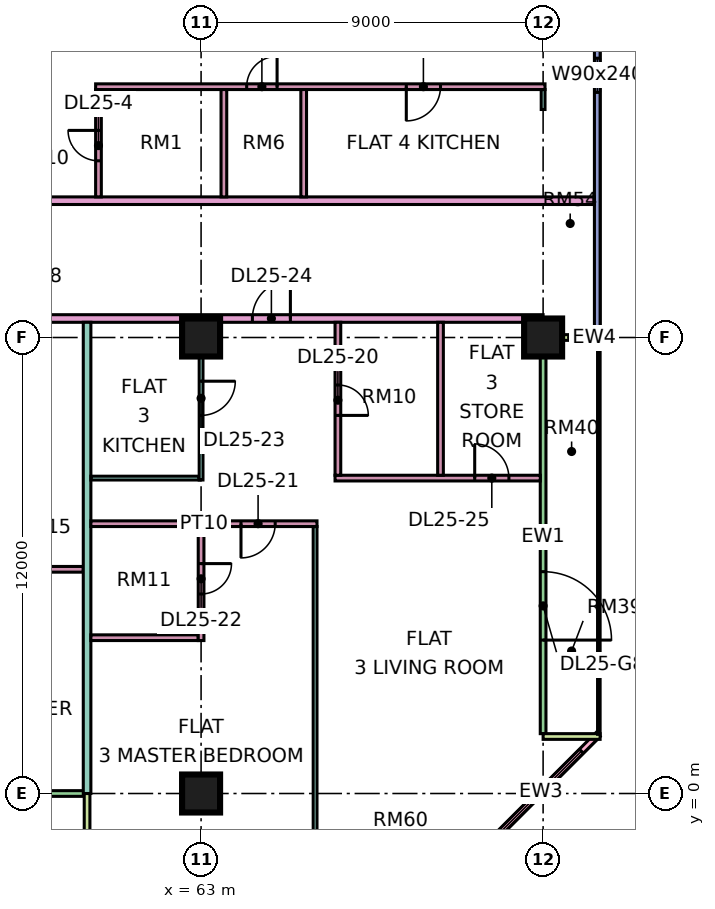
"""IFC4 building model, lengths in metres.
Left out: names, types, materials, properties, quantities, classifications, styles, units other than length and angle.
Written with IfcOpenShell. Run it as: python <this file> out.ifc"""

import sys

from ifc_helpers import new_model, si_unit, direction, frame, frame_2d, origin, origin_2d, place, context, subcontext, project, spatial, rectangle, extrude, element, fill, save


model = new_model("IFC4")
c1 = context("Model", 3, precision=1e-05, world=origin(), true_north=direction((0.0, 1.0)))
c2 = subcontext(c1, "Body", "Model", "MODEL_VIEW")
j1 = project(units=[si_unit("LENGTHUNIT", "METRE"), si_unit("PLANEANGLEUNIT", "RADIAN")], contexts=[c1])
p1 = place(None, origin())
s1 = spatial("IfcSite", under=j1, at=p1, CompositionType="ELEMENT")
p2 = place(p1, origin())
s2 = spatial("IfcBuilding", under=s1, at=p2, CompositionType="ELEMENT")
p3 = place(p2, frame((0.0, 0.0, 110.65)))
s3 = spatial("IfcBuildingStorey", under=s2, at=p3, CompositionType="ELEMENT", Elevation=110.65)
for number, where, z_axis, x_axis in (
    (1, (63.0, 0.0, 0.0), (0.0, 0.0, 1.0), (1.0, 0.0, 0.0)),
    (2, (63.0, 12.0, 0.0), (0.0, 0.0, 1.0), (1.0, 0.0, 0.0)),
    (3, (72.0, 12.0, 0.0), (0.0, 0.0, 1.0), (1.0, 0.0, 0.0)),
):
    element("IfcColumn", number, at=place(p3, frame(where, z_axis=z_axis, x_axis=x_axis)), inside=s3, PredefinedType="COLUMN", context=c2, shape_type="SweptSolid", body=[
        extrude(rectangle(XDim=1.0, YDim=1.0, at=origin_2d()), origin(), (0.0, 0.0, 1.0), 3.75),
    ])
p4 = place(p3, frame((48.075, 0.0, 0.0), z_axis=(0.0, 0.0, 1.0), x_axis=(1.0, 0.0, 0.0)))
e4 = element("IfcWall", 4, at=p4, inside=s3, PredefinedType="SOLIDWALL", context=c2, shape_type="SweptSolid", body=[
    extrude(rectangle(XDim=11.85, YDim=0.15, at=frame_2d((5.925, 0.0))), origin(), (0.0, 0.0, 1.0), 3.35),
])
p5 = place(p4, frame((0.562, 0.0, 0.45)))
e5 = element("IfcOpeningElement", 5, at=p5, cuts=e4, PredefinedType="OPENING", context=c2, shape_type="SweptSolid", body=[
    extrude(rectangle(XDim=1.8, YDim=2.4, at=frame_2d((0.9, 1.2))), frame((0.0, 0.085, 0.0), z_axis=(0.0, -1.0, 0.0), x_axis=(1.0, 0.0, 0.0)), (0.0, 0.0, 1.0), 0.17),
])
p6 = place(p4, frame((3.525, 0.0, 0.0)))
e6 = element("IfcOpeningElement", 6, at=p6, cuts=e4, PredefinedType="OPENING", context=c2, shape_type="SweptSolid", body=[
    extrude(rectangle(XDim=1.2, YDim=2.4, at=frame_2d((0.6, 1.2))), frame((0.0, 0.085, 0.0), z_axis=(0.0, -1.0, 0.0), x_axis=(1.0, 0.0, 0.0)), (0.0, 0.0, 1.0), 0.17),
])
p7 = place(p4, frame((7.688, 0.0, 0.45)))
e7 = element("IfcOpeningElement", 7, at=p7, cuts=e4, PredefinedType="OPENING", context=c2, shape_type="SweptSolid", body=[
    extrude(rectangle(XDim=3.0, YDim=2.4, at=frame_2d((1.5, 1.2))), frame((0.0, 0.085, 0.0), z_axis=(0.0, -1.0, 0.0), x_axis=(1.0, 0.0, 0.0)), (0.0, 0.0, 1.0), 0.17),
])
p8 = place(p3, frame((60.0, -1.5, 0.0), z_axis=(0.0, 0.0, 1.0), x_axis=(0.0, 1.0, 0.0)))
e8 = element("IfcWall", 8, at=p8, inside=s3, PredefinedType="SOLIDWALL", context=c2, shape_type="SweptSolid", body=[
    extrude(rectangle(XDim=1.5, YDim=0.15, at=frame_2d((0.75, 0.0))), origin(), (0.0, 0.0, 1.0), 3.35),
])
p9 = place(p3, frame((70.447, -1.447, 0.0), z_axis=(0.0, 0.0, 1.0), x_axis=(0.707106781187, 0.707106781187, 0.0)))
e9 = element("IfcWall", 9, at=p9, inside=s3, PredefinedType="SOLIDWALL", context=c2, shape_type="SweptSolid", body=[
    extrude(rectangle(XDim=4.243, YDim=0.15, at=frame_2d((2.121, 0.0))), origin(), (0.0, 0.0, 1.0), 3.35),
])
p10 = place(p9, frame((0.621, 0.0, 0.45)))
e10 = element("IfcOpeningElement", 10, at=p10, cuts=e9, PredefinedType="OPENING", context=c2, shape_type="SweptSolid", body=[
    extrude(rectangle(XDim=3.0, YDim=2.4, at=frame_2d((1.5, 1.2))), frame((0.0, 0.085, 0.0), z_axis=(0.0, -1.0, 0.0), x_axis=(1.0, 0.0, 0.0)), (0.0, 0.0, 1.0), 0.17),
])
p11 = place(p3, frame((72.0, 1.575, 0.0), z_axis=(0.0, 0.0, 1.0), x_axis=(0.0, 1.0, 0.0)))
e11 = element("IfcWall", 11, at=p11, inside=s3, PredefinedType="SOLIDWALL", context=c2, shape_type="SweptSolid", body=[
    extrude(rectangle(XDim=10.35, YDim=0.15, at=frame_2d((5.175, 0.0))), origin(), (0.0, 0.0, 1.0), 3.35),
])
p12 = place(p11, frame((2.462, 0.0, 0.0)))
e12 = element("IfcOpeningElement", 12, at=p12, cuts=e11, PredefinedType="OPENING", context=c2, shape_type="SweptSolid", body=[
    extrude(rectangle(XDim=1.8, YDim=2.4, at=frame_2d((0.9, 1.2))), frame((0.0, 0.085, 0.0), z_axis=(0.0, -1.0, 0.0), x_axis=(1.0, 0.0, 0.0)), (0.0, 0.0, 1.0), 0.17),
])
for number, where, z_axis, x_axis in (
    (13, (73.5, 1.5, 0.0), (0.0, 0.0, 1.0), (-1.0, 0.0, 0.0)),
    (14, (73.5, 12.0, 0.0), (0.0, 0.0, 1.0), (-1.0, 0.0, 0.0)),
):
    element("IfcWall", number, at=place(p3, frame(where, z_axis=z_axis, x_axis=x_axis)), inside=s3, PredefinedType="SOLIDWALL", context=c2, shape_type="SweptSolid", body=[
        extrude(rectangle(XDim=1.5, YDim=0.15, at=frame_2d((0.75, 0.0))), origin(), (0.0, 0.0, 1.0), 3.35),
    ])
p13 = place(p3, frame((73.425, 12.075, 0.0), z_axis=(0.0, 0.0, 1.0), x_axis=(0.0, 1.0, 0.0)))
e15 = element("IfcWall", 15, at=p13, inside=s3, PredefinedType="SOLIDWALL", context=c2, shape_type="SweptSolid", body=[
    extrude(rectangle(XDim=10.425, YDim=0.15, at=frame_2d((5.212, 0.0))), origin(), (0.0, 0.0, 1.0), 3.35),
])
p14 = place(p13, frame((6.375, 0.0, 0.45)))
e16 = element("IfcOpeningElement", 16, at=p14, cuts=e15, PredefinedType="OPENING", context=c2, shape_type="SweptSolid", body=[
    extrude(rectangle(XDim=0.9, YDim=2.4, at=frame_2d((0.45, 1.2))), frame((0.0, 0.085, 0.0), z_axis=(0.0, -1.0, 0.0), x_axis=(1.0, 0.0, 0.0)), (0.0, 0.0, 1.0), 0.17),
])
p15 = place(p13, frame((8.175, 0.0, 0.45)))
e17 = element("IfcOpeningElement", 17, at=p15, cuts=e15, PredefinedType="OPENING", context=c2, shape_type="SweptSolid", body=[
    extrude(rectangle(XDim=1.8, YDim=2.4, at=frame_2d((0.9, 1.2))), frame((0.0, 0.085, 0.0), z_axis=(0.0, -1.0, 0.0), x_axis=(1.0, 0.0, 0.0)), (0.0, 0.0, 1.0), 0.17),
])
p16 = place(p3, frame((40.65, 12.5, 0.0), z_axis=(0.0, 0.0, 1.0), x_axis=(1.0, 0.0, 0.0)))
e18 = element("IfcWall", 18, at=p16, inside=s3, PredefinedType="PARTITIONING", context=c2, shape_type="SweptSolid", body=[
    extrude(rectangle(XDim=31.35, YDim=0.2, at=frame_2d((15.675, 0.0))), origin(), (0.0, 0.0, 1.0), 3.35),
])
p17 = place(p16, frame((17.1, 0.0, 0.0)))
e19 = element("IfcOpeningElement", 19, at=p17, cuts=e18, PredefinedType="OPENING", context=c2, shape_type="SweptSolid", body=[
    extrude(rectangle(XDim=1.0, YDim=2.1, at=frame_2d((0.5, 1.05))), frame((0.0, 0.11, 0.0), z_axis=(0.0, -1.0, 0.0), x_axis=(1.0, 0.0, 0.0)), (0.0, 0.0, 1.0), 0.22),
])
p18 = place(p16, frame((23.7, 0.0, 0.0)))
e20 = element("IfcOpeningElement", 20, at=p18, cuts=e18, PredefinedType="OPENING", context=c2, shape_type="SweptSolid", body=[
    extrude(rectangle(XDim=1.0, YDim=2.1, at=frame_2d((0.5, 1.05))), frame((0.0, 0.11, 0.0), z_axis=(0.0, -1.0, 0.0), x_axis=(1.0, 0.0, 0.0)), (0.0, 0.0, 1.0), 0.22),
])
p19 = place(p16, frame((1.05, 0.0, 0.0)))
e21 = element("IfcOpeningElement", 21, at=p19, cuts=e18, PredefinedType="OPENING", context=c2, shape_type="SweptSolid", body=[
    extrude(rectangle(XDim=1.0, YDim=2.1, at=frame_2d((0.5, 1.05))), frame((0.0, 0.11, 0.0), z_axis=(0.0, -1.0, 0.0), x_axis=(1.0, 0.0, 0.0)), (0.0, 0.0, 1.0), 0.22),
])
p20 = place(p3, frame((50.95, 5.9, 0.0), z_axis=(0.0, 0.0, 1.0), x_axis=(1.0, 0.0, 0.0)))
e22 = element("IfcWall", 22, at=p20, inside=s3, PredefinedType="PARTITIONING", context=c2, shape_type="SweptSolid", body=[
    extrude(rectangle(XDim=8.95, YDim=0.15, at=frame_2d((4.475, 0.0))), origin(), (0.0, 0.0, 1.0), 3.35),
])
p21 = place(p20, frame((1.1, 0.0, 0.0)))
e23 = element("IfcOpeningElement", 23, at=p21, cuts=e22, PredefinedType="OPENING", context=c2, shape_type="SweptSolid", body=[
    extrude(rectangle(XDim=0.9, YDim=2.1, at=frame_2d((0.45, 1.05))), frame((0.0, 0.085, 0.0), z_axis=(0.0, -1.0, 0.0), x_axis=(1.0, 0.0, 0.0)), (0.0, 0.0, 1.0), 0.17),
])
p22 = place(p20, frame((7.1, 0.0, 0.0)))
e24 = element("IfcOpeningElement", 24, at=p22, cuts=e22, PredefinedType="OPENING", context=c2, shape_type="SweptSolid", body=[
    extrude(rectangle(XDim=0.9, YDim=2.1, at=frame_2d((0.45, 1.05))), frame((0.0, 0.085, 0.0), z_axis=(0.0, -1.0, 0.0), x_axis=(1.0, 0.0, 0.0)), (0.0, 0.0, 1.0), 0.17),
])
p23 = place(p3, frame((51.225, 15.6, 0.0), z_axis=(0.0, 0.0, 1.0), x_axis=(1.0, 0.0, 0.0)))
e25 = element("IfcWall", 25, at=p23, inside=s3, PredefinedType="PARTITIONING", context=c2, shape_type="SweptSolid", body=[
    extrude(rectangle(XDim=22.125, YDim=0.2, at=frame_2d((11.062, 0.0))), origin(), (0.0, 0.0, 1.0), 3.35),
])
p24 = place(p23, frame((6.725, 0.0, 0.0)))
e26 = element("IfcOpeningElement", 26, at=p24, cuts=e25, PredefinedType="OPENING", context=c2, shape_type="SweptSolid", body=[
    extrude(rectangle(XDim=1.0, YDim=2.1, at=frame_2d((0.5, 1.05))), frame((0.0, 0.11, 0.0), z_axis=(0.0, -1.0, 0.0), x_axis=(1.0, 0.0, 0.0)), (0.0, 0.0, 1.0), 0.22),
])
p25 = place(p23, frame((0.875, 0.0, 0.0)))
e27 = element("IfcOpeningElement", 27, at=p25, cuts=e25, PredefinedType="OPENING", context=c2, shape_type="SweptSolid", body=[
    extrude(rectangle(XDim=1.0, YDim=2.1, at=frame_2d((0.5, 1.05))), frame((0.0, 0.11, 0.0), z_axis=(0.0, -1.0, 0.0), x_axis=(1.0, 0.0, 0.0)), (0.0, 0.0, 1.0), 0.22),
])
p26 = place(p3, frame((60.0, 0.0, 0.0), z_axis=(0.0, 0.0, 1.0), x_axis=(0.0, 1.0, 0.0)))
e28 = element("IfcWall", 28, at=p26, inside=s3, PredefinedType="PARTITIONING", context=c2, shape_type="SweptSolid", body=[
    extrude(rectangle(XDim=12.4, YDim=0.2, at=frame_2d((6.2, 0.0))), origin(), (0.0, 0.0, 1.0), 3.35),
])
p27 = place(p3, frame((60.1, 4.1, 0.0), z_axis=(0.0, 0.0, 1.0), x_axis=(1.0, 0.0, 0.0)))
e29 = element("IfcWall", 29, at=p27, inside=s3, PredefinedType="PARTITIONING", context=c2, shape_type="SweptSolid", body=[
    extrude(rectangle(XDim=2.825, YDim=0.15, at=frame_2d((1.413, 0.0))), origin(), (0.0, 0.0, 1.0), 3.35),
])
p28 = place(p3, frame((60.1, 7.1, 0.0), z_axis=(0.0, 0.0, 1.0), x_axis=(1.0, 0.0, 0.0)))
e30 = element("IfcWall", 30, at=p28, inside=s3, PredefinedType="PARTITIONING", context=c2, shape_type="SweptSolid", body=[
    extrude(rectangle(XDim=5.95, YDim=0.15, at=frame_2d((2.975, 0.0))), origin(), (0.0, 0.0, 1.0), 3.35),
])
p29 = place(p28, frame((3.95, 0.0, 0.0)))
e31 = element("IfcOpeningElement", 31, at=p29, cuts=e30, PredefinedType="OPENING", context=c2, shape_type="SweptSolid", body=[
    extrude(rectangle(XDim=0.9, YDim=2.1, at=frame_2d((0.45, 1.05))), frame((0.0, 0.085, 0.0), z_axis=(0.0, -1.0, 0.0), x_axis=(1.0, 0.0, 0.0)), (0.0, 0.0, 1.0), 0.17),
])
p30 = place(p3, frame((60.1, 8.3, 0.0), z_axis=(0.0, 0.0, 1.0), x_axis=(1.0, 0.0, 0.0)))
e32 = element("IfcWall", 32, at=p30, inside=s3, PredefinedType="PARTITIONING", context=c2, shape_type="SweptSolid", body=[
    extrude(rectangle(XDim=2.85, YDim=0.1, at=frame_2d((1.425, 0.0))), origin(), (0.0, 0.0, 1.0), 3.35),
])
p31 = place(p3, frame((60.225, 18.6, 0.0), z_axis=(0.0, 0.0, 1.0), x_axis=(1.0, 0.0, 0.0)))
e33 = element("IfcWall", 33, at=p31, inside=s3, PredefinedType="PARTITIONING", context=c2, shape_type="SweptSolid", body=[
    extrude(rectangle(XDim=11.825, YDim=0.15, at=frame_2d((5.913, 0.0))), origin(), (0.0, 0.0, 1.0), 3.35),
])
p32 = place(p31, frame((8.175, 0.0, 0.0)))
e34 = element("IfcOpeningElement", 34, at=p32, cuts=e33, PredefinedType="OPENING", context=c2, shape_type="SweptSolid", body=[
    extrude(rectangle(XDim=0.9, YDim=2.1, at=frame_2d((0.45, 1.05))), frame((0.0, 0.085, 0.0), z_axis=(0.0, -1.0, 0.0), x_axis=(1.0, 0.0, 0.0)), (0.0, 0.0, 1.0), 0.17),
])
p33 = place(p31, frame((3.975, 0.0, 0.0)))
e35 = element("IfcOpeningElement", 35, at=p33, cuts=e33, PredefinedType="OPENING", context=c2, shape_type="SweptSolid", body=[
    extrude(rectangle(XDim=0.8, YDim=2.1, at=frame_2d((0.4, 1.05))), frame((0.0, 0.085, 0.0), z_axis=(0.0, -1.0, 0.0), x_axis=(1.0, 0.0, 0.0)), (0.0, 0.0, 1.0), 0.17),
])
p34 = place(p3, frame((60.3, 15.7, 0.0), z_axis=(0.0, 0.0, 1.0), x_axis=(0.0, 1.0, 0.0)))
e36 = element("IfcWall", 36, at=p34, inside=s3, PredefinedType="PARTITIONING", context=c2, shape_type="SweptSolid", body=[
    extrude(rectangle(XDim=2.825, YDim=0.15, at=frame_2d((1.413, 0.0))), origin(), (0.0, 0.0, 1.0), 3.35),
])
p35 = place(p34, frame((0.95, 0.0, 0.0)))
e37 = element("IfcOpeningElement", 37, at=p35, cuts=e36, PredefinedType="OPENING", context=c2, shape_type="SweptSolid", body=[
    extrude(rectangle(XDim=0.8, YDim=2.1, at=frame_2d((0.4, 1.05))), frame((0.0, 0.085, 0.0), z_axis=(0.0, -1.0, 0.0), x_axis=(1.0, 0.0, 0.0)), (0.0, 0.0, 1.0), 0.17),
])
p36 = place(p3, frame((63.0, 4.025, 0.0), z_axis=(0.0, 0.0, 1.0), x_axis=(0.0, 1.0, 0.0)))
e38 = element("IfcWall", 38, at=p36, inside=s3, PredefinedType="PARTITIONING", context=c2, shape_type="SweptSolid", body=[
    extrude(rectangle(XDim=3.0, YDim=0.15, at=frame_2d((1.5, 0.0))), origin(), (0.0, 0.0, 1.0), 3.35),
])
p37 = place(p36, frame((1.225, 0.0, 0.0)))
e39 = element("IfcOpeningElement", 39, at=p37, cuts=e38, PredefinedType="OPENING", context=c2, shape_type="SweptSolid", body=[
    extrude(rectangle(XDim=0.8, YDim=2.1, at=frame_2d((0.4, 1.05))), frame((0.0, 0.085, 0.0), z_axis=(0.0, -1.0, 0.0), x_axis=(1.0, 0.0, 0.0)), (0.0, 0.0, 1.0), 0.17),
])
p38 = place(p3, frame((63.0, 8.25, 0.0), z_axis=(0.0, 0.0, 1.0), x_axis=(0.0, 1.0, 0.0)))
e40 = element("IfcWall", 40, at=p38, inside=s3, PredefinedType="PARTITIONING", context=c2, shape_type="SweptSolid", body=[
    extrude(rectangle(XDim=4.15, YDim=0.1, at=frame_2d((2.075, 0.0))), origin(), (0.0, 0.0, 1.0), 3.35),
])
p39 = place(p38, frame((1.7, 0.0, 0.0)))
e41 = element("IfcOpeningElement", 41, at=p39, cuts=e40, PredefinedType="OPENING", context=c2, shape_type="SweptSolid", body=[
    extrude(rectangle(XDim=0.9, YDim=2.1, at=frame_2d((0.45, 1.05))), frame((0.0, 0.06, 0.0), z_axis=(0.0, -1.0, 0.0), x_axis=(1.0, 0.0, 0.0)), (0.0, 0.0, 1.0), 0.12),
])
for number, where, z_axis, x_axis in (
    (42, (63.6, 15.7, 0.0), (0.0, 0.0, 1.0), (0.0, 1.0, 0.0)),
    (43, (65.7, 15.7, 0.0), (0.0, 0.0, 1.0), (0.0, 1.0, 0.0)),
):
    element("IfcWall", number, at=place(p3, frame(where, z_axis=z_axis, x_axis=x_axis)), inside=s3, PredefinedType="PARTITIONING", context=c2, shape_type="SweptSolid", body=[
        extrude(rectangle(XDim=2.825, YDim=0.15, at=frame_2d((1.413, 0.0))), origin(), (0.0, 0.0, 1.0), 3.35),
    ])
p40 = place(p3, frame((66.0, -1.35, 0.0), z_axis=(0.0, 0.0, 1.0), x_axis=(0.0, 1.0, 0.0)))
e44 = element("IfcWall", 44, at=p40, inside=s3, PredefinedType="PARTITIONING", context=c2, shape_type="SweptSolid", body=[
    extrude(rectangle(XDim=8.375, YDim=0.1, at=frame_2d((4.188, 0.0))), origin(), (0.0, 0.0, 1.0), 3.35),
])
p41 = place(p3, frame((66.525, 8.3, 0.0), z_axis=(0.0, 0.0, 1.0), x_axis=(1.0, 0.0, 0.0)))
e45 = element("IfcWall", 45, at=p41, inside=s3, PredefinedType="PARTITIONING", context=c2, shape_type="SweptSolid", body=[
    extrude(rectangle(XDim=5.401, YDim=0.15, at=frame_2d((2.701, 0.0))), origin(), (0.0, 0.0, 1.0), 3.35),
])
p42 = place(p41, frame((3.675, 0.0, 0.0)))
e46 = element("IfcOpeningElement", 46, at=p42, cuts=e45, PredefinedType="OPENING", context=c2, shape_type="SweptSolid", body=[
    extrude(rectangle(XDim=0.9, YDim=2.1, at=frame_2d((0.45, 1.05))), frame((0.0, 0.085, 0.0), z_axis=(0.0, -1.0, 0.0), x_axis=(1.0, 0.0, 0.0)), (0.0, 0.0, 1.0), 0.17),
])
p43 = place(p3, frame((66.6, 8.375, 0.0), z_axis=(0.0, 0.0, 1.0), x_axis=(0.0, 1.0, 0.0)))
e47 = element("IfcWall", 47, at=p43, inside=s3, PredefinedType="PARTITIONING", context=c2, shape_type="SweptSolid", body=[
    extrude(rectangle(XDim=4.025, YDim=0.15, at=frame_2d((2.012, 0.0))), origin(), (0.0, 0.0, 1.0), 3.35),
])
p44 = place(p43, frame((1.575, 0.0, 0.0)))
e48 = element("IfcOpeningElement", 48, at=p44, cuts=e47, PredefinedType="OPENING", context=c2, shape_type="SweptSolid", body=[
    extrude(rectangle(XDim=0.8, YDim=2.1, at=frame_2d((0.4, 1.05))), frame((0.0, 0.085, 0.0), z_axis=(0.0, -1.0, 0.0), x_axis=(1.0, 0.0, 0.0)), (0.0, 0.0, 1.0), 0.17),
])
p45 = place(p3, frame((69.3, 8.375, 0.0), z_axis=(0.0, 0.0, 1.0), x_axis=(0.0, 1.0, 0.0)))
e49 = element("IfcWall", 49, at=p45, inside=s3, PredefinedType="PARTITIONING", context=c2, shape_type="SweptSolid", body=[
    extrude(rectangle(XDim=4.025, YDim=0.15, at=frame_2d((2.012, 0.0))), origin(), (0.0, 0.0, 1.0), 3.35),
])
p46 = place(p3, frame((72.0, 18.0, 0.0), z_axis=(0.0, 0.0, 1.0), x_axis=(0.0, 1.0, 0.0)))
e50 = element("IfcWall", 50, at=p46, inside=s3, PredefinedType="PARTITIONING", context=c2, shape_type="SweptSolid", body=[
    extrude(rectangle(XDim=0.525, YDim=0.1, at=frame_2d((0.262, 0.0))), origin(), (0.0, 0.0, 1.0), 3.35),
])
p47 = place(p10, origin())
e51 = element("IfcWindow", 51, at=p47, inside=s3, PartitioningType="SINGLE_PANEL", PredefinedType="WINDOW", context=c2, shape_type="SweptSolid", body=[
    extrude(rectangle(XDim=3.0, YDim=2.4, at=frame_2d((1.5, 1.2))), frame((0.0, 0.03, 0.0), z_axis=(0.0, -1.0, 0.0), x_axis=(1.0, 0.0, 0.0)), (0.0, 0.0, 1.0), 0.06),
])
fill(e10, e51)
p48 = place(p12, frame((1.8, 0.0, 0.0), z_axis=(0.0, 0.0, 1.0), x_axis=(-1.0, 0.0, 0.0)))
e52 = element("IfcDoor", 52, at=p48, inside=s3, OperationType="DOUBLE_DOOR_SINGLE_SWING", PredefinedType="DOOR", context=c2, shape_type="SweptSolid", body=[
    extrude(rectangle(XDim=1.8, YDim=2.4, at=frame_2d((0.9, 1.2))), frame((0.0, 0.025, 0.0), z_axis=(0.0, -1.0, 0.0), x_axis=(1.0, 0.0, 0.0)), (0.0, 0.0, 1.0), 0.05),
])
fill(e12, e52)
p49 = place(p14, origin())
e53 = element("IfcWindow", 53, at=p49, inside=s3, PartitioningType="SINGLE_PANEL", PredefinedType="WINDOW", context=c2, shape_type="SweptSolid", body=[
    extrude(rectangle(XDim=0.9, YDim=2.4, at=frame_2d((0.45, 1.2))), frame((0.0, 0.03, 0.0), z_axis=(0.0, -1.0, 0.0), x_axis=(1.0, 0.0, 0.0)), (0.0, 0.0, 1.0), 0.06),
])
fill(e16, e53)
p50 = place(p35, frame((0.8, 0.0, 0.0), z_axis=(0.0, 0.0, 1.0), x_axis=(-1.0, 0.0, 0.0)))
e54 = element("IfcDoor", 54, at=p50, inside=s3, OperationType="SINGLE_SWING_RIGHT", PredefinedType="DOOR", context=c2, shape_type="SweptSolid", body=[
    extrude(rectangle(XDim=0.8, YDim=2.1, at=frame_2d((0.4, 1.05))), frame((0.0, 0.025, 0.0), z_axis=(0.0, -1.0, 0.0), x_axis=(1.0, 0.0, 0.0)), (0.0, 0.0, 1.0), 0.05),
])
fill(e37, e54)
p51 = place(p32, frame((0.9, 0.0, 0.0), z_axis=(0.0, 0.0, 1.0), x_axis=(-1.0, 0.0, 0.0)))
e55 = element("IfcDoor", 55, at=p51, inside=s3, OperationType="SINGLE_SWING_LEFT", PredefinedType="DOOR", context=c2, shape_type="SweptSolid", body=[
    extrude(rectangle(XDim=0.9, YDim=2.1, at=frame_2d((0.45, 1.05))), frame((0.0, 0.025, 0.0), z_axis=(0.0, -1.0, 0.0), x_axis=(1.0, 0.0, 0.0)), (0.0, 0.0, 1.0), 0.05),
])
fill(e34, e55)
p52 = place(p33, frame((0.8, 0.0, 0.0), z_axis=(0.0, 0.0, 1.0), x_axis=(-1.0, 0.0, 0.0)))
e56 = element("IfcDoor", 56, at=p52, inside=s3, OperationType="SINGLE_SWING_RIGHT", PredefinedType="DOOR", context=c2, shape_type="SweptSolid", body=[
    extrude(rectangle(XDim=0.8, YDim=2.1, at=frame_2d((0.4, 1.05))), frame((0.0, 0.025, 0.0), z_axis=(0.0, -1.0, 0.0), x_axis=(1.0, 0.0, 0.0)), (0.0, 0.0, 1.0), 0.05),
])
fill(e35, e56)
p53 = place(p44, frame((0.8, 0.0, 0.0), z_axis=(0.0, 0.0, 1.0), x_axis=(-1.0, 0.0, 0.0)))
e57 = element("IfcDoor", 57, at=p53, inside=s3, OperationType="SINGLE_SWING_LEFT", PredefinedType="DOOR", context=c2, shape_type="SweptSolid", body=[
    extrude(rectangle(XDim=0.8, YDim=2.1, at=frame_2d((0.4, 1.05))), frame((0.0, 0.025, 0.0), z_axis=(0.0, -1.0, 0.0), x_axis=(1.0, 0.0, 0.0)), (0.0, 0.0, 1.0), 0.05),
])
fill(e48, e57)
p54 = place(p29, frame((0.9, 0.0, 0.0), z_axis=(0.0, 0.0, 1.0), x_axis=(-1.0, 0.0, 0.0)))
e58 = element("IfcDoor", 58, at=p54, inside=s3, OperationType="SINGLE_SWING_LEFT", PredefinedType="DOOR", context=c2, shape_type="SweptSolid", body=[
    extrude(rectangle(XDim=0.9, YDim=2.1, at=frame_2d((0.45, 1.05))), frame((0.0, 0.025, 0.0), z_axis=(0.0, -1.0, 0.0), x_axis=(1.0, 0.0, 0.0)), (0.0, 0.0, 1.0), 0.05),
])
fill(e31, e58)
p55 = place(p37, origin())
e59 = element("IfcDoor", 59, at=p55, inside=s3, OperationType="SINGLE_SWING_RIGHT", PredefinedType="DOOR", context=c2, shape_type="SweptSolid", body=[
    extrude(rectangle(XDim=0.8, YDim=2.1, at=frame_2d((0.4, 1.05))), frame((0.0, 0.025, 0.0), z_axis=(0.0, -1.0, 0.0), x_axis=(1.0, 0.0, 0.0)), (0.0, 0.0, 1.0), 0.05),
])
fill(e39, e59)
p56 = place(p39, origin())
e60 = element("IfcDoor", 60, at=p56, inside=s3, OperationType="SINGLE_SWING_RIGHT", PredefinedType="DOOR", context=c2, shape_type="SweptSolid", body=[
    extrude(rectangle(XDim=0.9, YDim=2.1, at=frame_2d((0.45, 1.05))), frame((0.0, 0.025, 0.0), z_axis=(0.0, -1.0, 0.0), x_axis=(1.0, 0.0, 0.0)), (0.0, 0.0, 1.0), 0.05),
])
fill(e41, e60)
p57 = place(p18, frame((1.0, 0.0, 0.0), z_axis=(0.0, 0.0, 1.0), x_axis=(-1.0, 0.0, 0.0)))
e61 = element("IfcDoor", 61, at=p57, inside=s3, OperationType="SINGLE_SWING_RIGHT", PredefinedType="DOOR", context=c2, shape_type="SweptSolid", body=[
    extrude(rectangle(XDim=1.0, YDim=2.1, at=frame_2d((0.5, 1.05))), frame((0.0, 0.025, 0.0), z_axis=(0.0, -1.0, 0.0), x_axis=(1.0, 0.0, 0.0)), (0.0, 0.0, 1.0), 0.05),
])
fill(e20, e61)
p58 = place(p42, origin())
e62 = element("IfcDoor", 62, at=p58, inside=s3, OperationType="SINGLE_SWING_LEFT", PredefinedType="DOOR", context=c2, shape_type="SweptSolid", body=[
    extrude(rectangle(XDim=0.9, YDim=2.1, at=frame_2d((0.45, 1.05))), frame((0.0, 0.025, 0.0), z_axis=(0.0, -1.0, 0.0), x_axis=(1.0, 0.0, 0.0)), (0.0, 0.0, 1.0), 0.05),
])
fill(e46, e62)
save(model, sys.argv[1])
